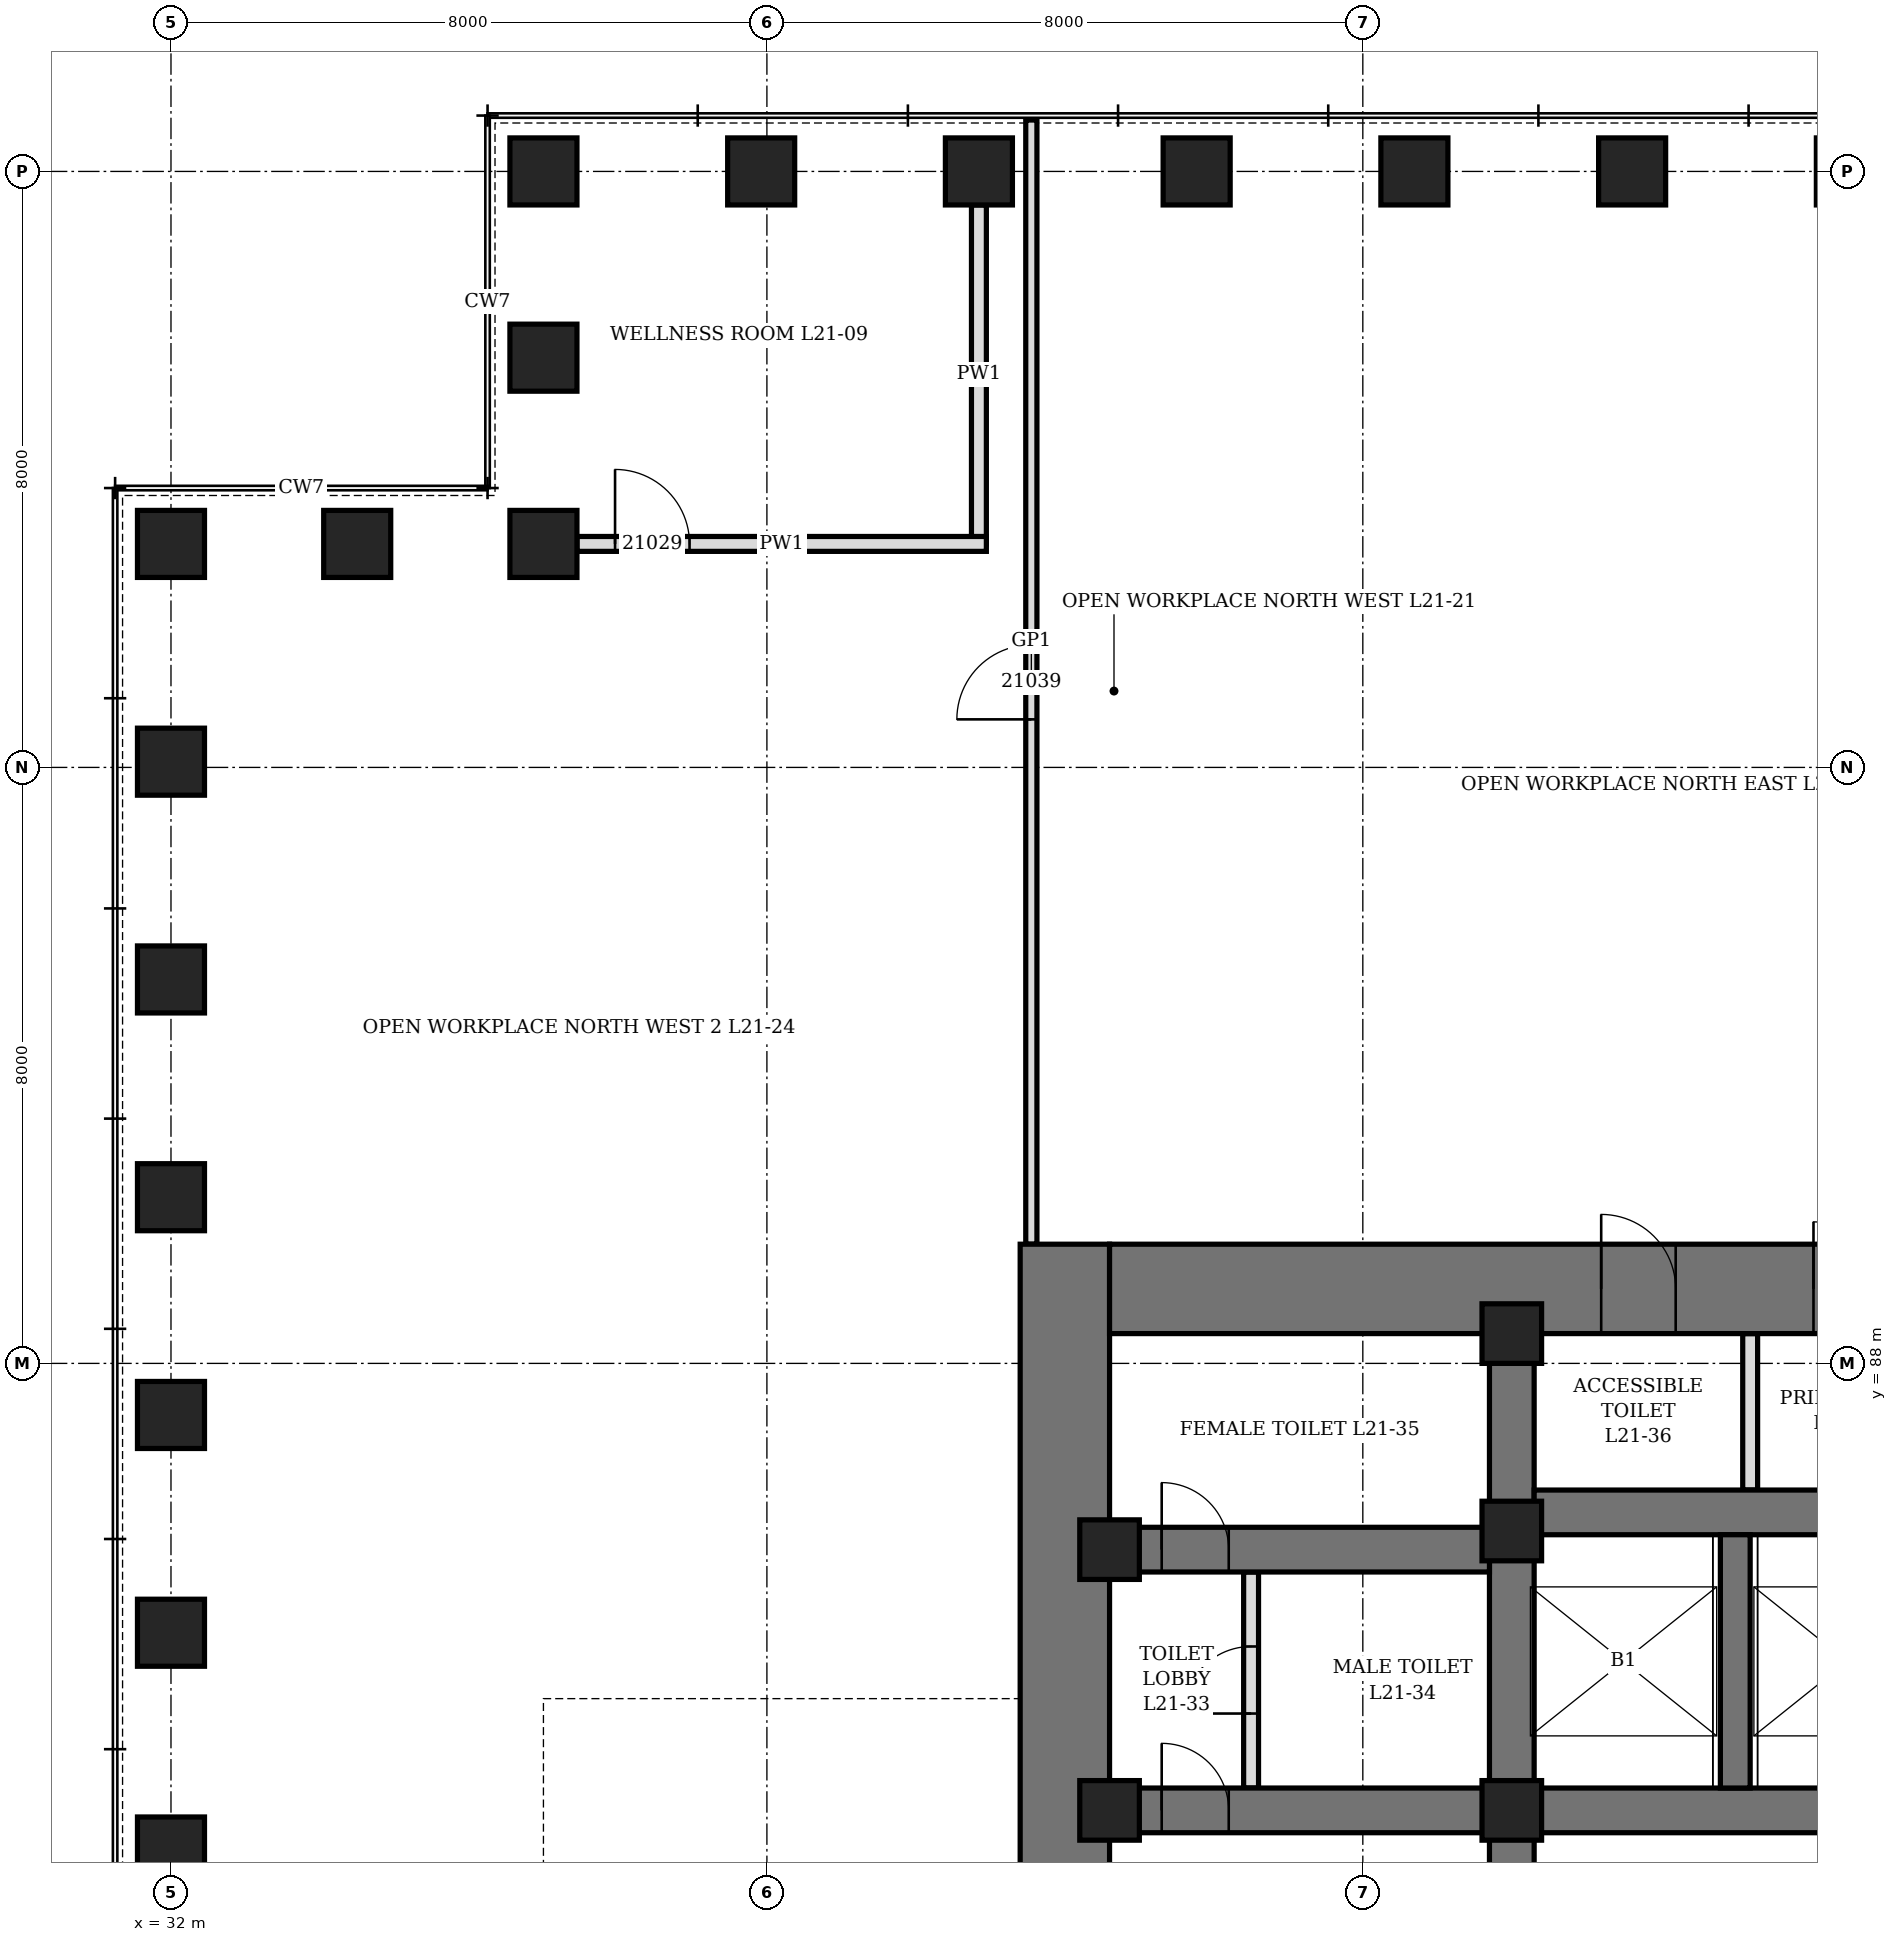
"""IFC4 building model, lengths in metres.
Left out: names, types, materials, properties, quantities, classifications, styles, units other than length and angle.
Written with IfcOpenShell. Run it as: python <this file> out.ifc"""

import sys

from ifc_helpers import new_model, si_unit, direction, frame, frame_2d, origin, origin_2d, place, context, subcontext, project, spatial, rectangle, hollow_rectangle, extrude, element, fill, save


model = new_model("IFC4")
c1 = context("Model", 3, precision=1e-05, world=origin(), true_north=direction((0.0, 1.0)))
c2 = subcontext(c1, "Body", "Model", "MODEL_VIEW")
j1 = project(units=[si_unit("LENGTHUNIT", "METRE"), si_unit("PLANEANGLEUNIT", "RADIAN")], contexts=[c1])
p1 = place(None, origin())
s1 = spatial("IfcSite", under=j1, at=p1, CompositionType="ELEMENT")
p2 = place(p1, origin())
s2 = spatial("IfcBuilding", under=s1, at=p2, CompositionType="ELEMENT")
p3 = place(p2, frame((0.0, 0.0, 97.9)))
s3 = spatial("IfcBuildingStorey", under=s2, at=p3, CompositionType="ELEMENT", Elevation=97.9)
for number, where, z_axis, x_axis in (
    (1, (54.539, 104.0, 0.0), (0.0, 0.0, 1.0), (1.0, 0.0, 0.0)),
    (2, (51.615, 104.0, 0.0), (0.0, 0.0, 1.0), (1.0, 0.0, 0.0)),
    (3, (48.692, 104.0, 0.0), (0.0, 0.0, 1.0), (1.0, 0.0, 0.0)),
    (4, (45.769, 104.0, 0.0), (0.0, 0.0, 1.0), (1.0, 0.0, 0.0)),
    (5, (42.846, 104.0, 0.0), (0.0, 0.0, 1.0), (1.0, 0.0, 0.0)),
    (6, (39.923, 104.0, 0.0), (0.0, 0.0, 1.0), (1.0, 0.0, 0.0)),
    (7, (37.0, 104.0, 0.0), (0.0, 0.0, 1.0), (0.0, 1.0, 0.0)),
    (8, (37.0, 101.5, 0.0), (0.0, 0.0, 1.0), (0.0, 1.0, 0.0)),
    (9, (37.0, 99.0, 0.0), (0.0, 0.0, 1.0), (1.0, 0.0, 0.0)),
    (10, (34.5, 99.0, 0.0), (0.0, 0.0, 1.0), (1.0, 0.0, 0.0)),
    (11, (32.0, 99.0, 0.0), (0.0, 0.0, 1.0), (0.0, 1.0, 0.0)),
    (12, (32.0, 96.077, 0.0), (0.0, 0.0, 1.0), (0.0, 1.0, 0.0)),
    (13, (32.0, 93.154, 0.0), (0.0, 0.0, 1.0), (0.0, 1.0, 0.0)),
    (14, (32.0, 90.231, 0.0), (0.0, 0.0, 1.0), (0.0, 1.0, 0.0)),
    (15, (32.0, 87.308, 0.0), (0.0, 0.0, 1.0), (0.0, 1.0, 0.0)),
    (16, (32.0, 84.385, 0.0), (0.0, 0.0, 1.0), (0.0, 1.0, 0.0)),
    (17, (32.0, 81.461, 0.0), (0.0, 0.0, 1.0), (0.0, 1.0, 0.0)),
):
    element("IfcColumn", number, at=place(p3, frame(where, z_axis=z_axis, x_axis=x_axis)), inside=s3, PredefinedType="COLUMN", context=c2, shape_type="SweptSolid", body=[
        extrude(hollow_rectangle(XDim=0.9, YDim=0.9, WallThickness=0.12, at=origin_2d()), origin(), (0.0, 0.0, 1.0), 4.2),
    ])
p4 = place(p3, frame((44.0, 70.4, 0.0), z_axis=(0.0, 0.0, 1.0), x_axis=(0.0, 1.0, 0.0)))
e18 = element("IfcWall", 18, at=p4, inside=s3, PredefinedType="SHEAR", context=c2, shape_type="SweptSolid", body=[
    extrude(rectangle(XDim=19.2, YDim=1.2, at=frame_2d((9.6, 0.0))), origin(), (0.0, 0.0, 1.0), 4.2),
])
p5 = place(p4, frame((8.6, 0.0, 0.0)))
e19 = element("IfcOpeningElement", 19, at=p5, cuts=e18, PredefinedType="OPENING", context=c2, shape_type="SweptSolid", body=[
    extrude(rectangle(XDim=2.0, YDim=2.4, at=frame_2d((1.0, 1.2))), frame((0.0, 0.61, 0.0), z_axis=(0.0, -1.0, 0.0), x_axis=(1.0, 0.0, 0.0)), (0.0, 0.0, 1.0), 1.22),
])
p6 = place(p3, frame((44.6, 89.0, 0.0), z_axis=(0.0, 0.0, 1.0), x_axis=(1.0, 0.0, 0.0)))
e20 = element("IfcWall", 20, at=p6, inside=s3, PredefinedType="SHEAR", context=c2, shape_type="SweptSolid", body=[
    extrude(rectangle(XDim=22.8, YDim=1.2, at=frame_2d((11.4, 0.0))), origin(), (0.0, 0.0, 1.0), 4.2),
])
p7 = place(p6, frame((6.6, 0.0, 0.0)))
e21 = element("IfcOpeningElement", 21, at=p7, cuts=e20, PredefinedType="OPENING", context=c2, shape_type="SweptSolid", body=[
    extrude(rectangle(XDim=1.0, YDim=2.1, at=frame_2d((0.5, 1.05))), frame((0.0, 0.61, 0.0), z_axis=(0.0, -1.0, 0.0), x_axis=(1.0, 0.0, 0.0)), (0.0, 0.0, 1.0), 1.22),
])
p8 = place(p6, frame((9.45, 0.0, 0.0)))
e22 = element("IfcOpeningElement", 22, at=p8, cuts=e20, PredefinedType="OPENING", context=c2, shape_type="SweptSolid", body=[
    extrude(rectangle(XDim=0.9, YDim=2.1, at=frame_2d((0.45, 1.05))), frame((0.0, 0.61, 0.0), z_axis=(0.0, -1.0, 0.0), x_axis=(1.0, 0.0, 0.0)), (0.0, 0.0, 1.0), 1.22),
])
p9 = place(p6, frame((13.05, 0.0, 0.0)))
e23 = element("IfcOpeningElement", 23, at=p9, cuts=e20, PredefinedType="OPENING", context=c2, shape_type="SweptSolid", body=[
    extrude(rectangle(XDim=0.9, YDim=2.1, at=frame_2d((0.45, 1.05))), frame((0.0, 0.61, 0.0), z_axis=(0.0, -1.0, 0.0), x_axis=(1.0, 0.0, 0.0)), (0.0, 0.0, 1.0), 1.22),
])
p10 = place(p3, frame((50.0, 71.6, 0.0), z_axis=(0.0, 0.0, 1.0), x_axis=(0.0, 1.0, 0.0)))
e24 = element("IfcWall", 24, at=p10, inside=s3, PredefinedType="SHEAR", context=c2, shape_type="SweptSolid", body=[
    extrude(rectangle(XDim=16.8, YDim=0.6, at=frame_2d((8.4, 0.0))), origin(), (0.0, 0.0, 1.0), 4.2),
])
p11 = place(p10, frame((7.5, 0.0, 0.0)))
e25 = element("IfcOpeningElement", 25, at=p11, cuts=e24, PredefinedType="OPENING", context=c2, shape_type="SweptSolid", body=[
    extrude(rectangle(XDim=1.8, YDim=2.4, at=frame_2d((0.9, 1.2))), frame((0.0, 0.31, 0.0), z_axis=(0.0, -1.0, 0.0), x_axis=(1.0, 0.0, 0.0)), (0.0, 0.0, 1.0), 0.62),
])
p12 = place(p3, frame((44.6, 82.0, 0.0), z_axis=(0.0, 0.0, 1.0), x_axis=(1.0, 0.0, 0.0)))
e26 = element("IfcWall", 26, at=p12, inside=s3, PredefinedType="SHEAR", context=c2, shape_type="SweptSolid", body=[
    extrude(rectangle(XDim=5.1, YDim=0.6, at=frame_2d((2.55, 0.0))), origin(), (0.0, 0.0, 1.0), 4.2),
])
p13 = place(p12, frame((0.7, 0.0, 0.0)))
e27 = element("IfcOpeningElement", 27, at=p13, cuts=e26, PredefinedType="OPENING", context=c2, shape_type="SweptSolid", body=[
    extrude(rectangle(XDim=0.9, YDim=2.1, at=frame_2d((0.45, 1.05))), frame((0.0, 0.31, 0.0), z_axis=(0.0, -1.0, 0.0), x_axis=(1.0, 0.0, 0.0)), (0.0, 0.0, 1.0), 0.62),
])
p14 = place(p3, frame((44.6, 85.5, 0.0), z_axis=(0.0, 0.0, 1.0), x_axis=(1.0, 0.0, 0.0)))
e28 = element("IfcWall", 28, at=p14, inside=s3, PredefinedType="SHEAR", context=c2, shape_type="SweptSolid", body=[
    extrude(rectangle(XDim=5.1, YDim=0.6, at=frame_2d((2.55, 0.0))), origin(), (0.0, 0.0, 1.0), 4.2),
])
p15 = place(p14, frame((0.7, 0.0, 0.0)))
e29 = element("IfcOpeningElement", 29, at=p15, cuts=e28, PredefinedType="OPENING", context=c2, shape_type="SweptSolid", body=[
    extrude(rectangle(XDim=0.9, YDim=2.1, at=frame_2d((0.45, 1.05))), frame((0.0, 0.31, 0.0), z_axis=(0.0, -1.0, 0.0), x_axis=(1.0, 0.0, 0.0)), (0.0, 0.0, 1.0), 0.62),
])
for number, where, z_axis, x_axis in (
    (30, (50.3, 82.0, 0.0), (0.0, 0.0, 1.0), (1.0, 0.0, 0.0)),
    (31, (50.3, 86.0, 0.0), (0.0, 0.0, 1.0), (1.0, 0.0, 0.0)),
):
    element("IfcWall", number, at=place(p3, frame(where, z_axis=z_axis, x_axis=x_axis)), inside=s3, PredefinedType="SHEAR", context=c2, shape_type="SweptSolid", body=[
        extrude(rectangle(XDim=11.4, YDim=0.6, at=frame_2d((5.7, 0.0))), origin(), (0.0, 0.0, 1.0), 4.2),
    ])
p16 = place(p3, frame((53.0, 82.3, 0.0), z_axis=(0.0, 0.0, 1.0), x_axis=(0.0, 1.0, 0.0)))
e32 = element("IfcWall", 32, at=p16, inside=s3, PredefinedType="SHEAR", context=c2, shape_type="SweptSolid", body=[
    extrude(rectangle(XDim=3.4, YDim=0.4, at=frame_2d((1.7, 0.0))), origin(), (0.0, 0.0, 1.0), 4.2),
])
for number, where, z_axis, x_axis in (
    (33, (44.6, 82.0, 0.0), (0.0, 0.0, 1.0), (1.0, 0.0, 0.0)),
    (34, (44.6, 85.5, 0.0), (0.0, 0.0, 1.0), (1.0, 0.0, 0.0)),
    (35, (50.0, 82.0, 0.0), (0.0, 0.0, 1.0), (1.0, 0.0, 0.0)),
    (36, (50.0, 85.75, 0.0), (0.0, 0.0, 1.0), (1.0, 0.0, 0.0)),
    (37, (50.0, 88.4, 0.0), (0.0, 0.0, 1.0), (1.0, 0.0, 0.0)),
):
    element("IfcColumn", number, at=place(p3, frame(where, z_axis=z_axis, x_axis=x_axis)), inside=s3, PredefinedType="COLUMN", context=c2, shape_type="SweptSolid", body=[
        extrude(hollow_rectangle(XDim=0.8, YDim=0.8, WallThickness=0.1, at=origin_2d()), origin(), (0.0, 0.0, 1.0), 4.2),
    ])
p17 = place(p3, frame((46.5, 82.3, 0.0), z_axis=(0.0, 0.0, 1.0), x_axis=(0.0, 1.0, 0.0)))
e38 = element("IfcWall", 38, at=p17, inside=s3, PredefinedType="PARTITIONING", context=c2, shape_type="SweptSolid", body=[
    extrude(rectangle(XDim=2.9, YDim=0.2, at=frame_2d((1.45, 0.0))), origin(), (0.0, 0.0, 1.0), 3.95),
])
p18 = place(p17, frame((1.0, 0.0, 0.0)))
e39 = element("IfcOpeningElement", 39, at=p18, cuts=e38, PredefinedType="OPENING", context=c2, shape_type="SweptSolid", body=[
    extrude(rectangle(XDim=0.9, YDim=2.1, at=frame_2d((0.45, 1.05))), frame((0.0, 0.11, 0.0), z_axis=(0.0, -1.0, 0.0), x_axis=(1.0, 0.0, 0.0)), (0.0, 0.0, 1.0), 0.22),
])
p19 = place(p3, frame((53.2, 86.3, 0.0), z_axis=(0.0, 0.0, 1.0), x_axis=(0.0, 1.0, 0.0)))
e40 = element("IfcWall", 40, at=p19, inside=s3, PredefinedType="PARTITIONING", context=c2, shape_type="SweptSolid", body=[
    extrude(rectangle(XDim=2.1, YDim=0.2, at=frame_2d((1.05, 0.0))), origin(), (0.0, 0.0, 1.0), 3.95),
])
p20 = place(p3, frame((42.846, 99.0, 0.0), z_axis=(0.0, 0.0, 1.0), x_axis=(0.0, 1.0, 0.0)))
e41 = element("IfcWall", 41, at=p20, inside=s3, PredefinedType="PARTITIONING", context=c2, shape_type="SweptSolid", body=[
    extrude(rectangle(XDim=4.55, YDim=0.2, at=frame_2d((2.275, 0.0))), origin(), (0.0, 0.0, 1.0), 1.95),
])
p21 = place(p3, frame((37.45, 99.0, 0.0), z_axis=(0.0, 0.0, 1.0), x_axis=(1.0, 0.0, 0.0)))
e42 = element("IfcWall", 42, at=p21, inside=s3, PredefinedType="PARTITIONING", context=c2, shape_type="SweptSolid", body=[
    extrude(rectangle(XDim=5.496, YDim=0.2, at=frame_2d((2.748, 0.0))), origin(), (0.0, 0.0, 1.0), 3.95),
])
p22 = place(p21, frame((0.511, 0.0, 0.0)))
e43 = element("IfcOpeningElement", 43, at=p22, cuts=e42, PredefinedType="OPENING", context=c2, shape_type="SweptSolid", body=[
    extrude(rectangle(XDim=1.0, YDim=2.1, at=frame_2d((0.5, 1.05))), frame((0.0, 0.11, 0.0), z_axis=(0.0, -1.0, 0.0), x_axis=(1.0, 0.0, 0.0)), (0.0, 0.0, 1.0), 0.22),
])
p23 = place(p3, frame((43.55, 89.6, 0.0), z_axis=(0.0, 0.0, 1.0), x_axis=(0.0, 1.0, 0.0)))
e44 = element("IfcWall", 44, at=p23, inside=s3, PredefinedType="PARTITIONING", context=c2, shape_type="SweptSolid", body=[
    extrude(rectangle(XDim=15.09, YDim=0.15, at=frame_2d((7.545, 0.0))), origin(), (0.0, 0.0, 1.0), 3.95),
])
p24 = place(p23, frame((7.045, 0.0, 0.0)))
e45 = element("IfcOpeningElement", 45, at=p24, cuts=e44, PredefinedType="OPENING", context=c2, shape_type="SweptSolid", body=[
    extrude(rectangle(XDim=1.0, YDim=2.4, at=frame_2d((0.5, 1.2))), frame((0.0, 0.085, 0.0), z_axis=(0.0, -1.0, 0.0), x_axis=(1.0, 0.0, 0.0)), (0.0, 0.0, 1.0), 0.17),
])
p25 = place(p13, origin())
e46 = element("IfcDoor", 46, at=p25, inside=s3, OperationType="SINGLE_SWING_LEFT", PredefinedType="DOOR", context=c2, shape_type="SweptSolid", body=[
    extrude(rectangle(XDim=0.9, YDim=2.1, at=frame_2d((0.45, 1.05))), frame((0.0, 0.3, 0.0), z_axis=(0.0, -1.0, 0.0), x_axis=(1.0, 0.0, 0.0)), (0.0, 0.0, 1.0), 0.6),
])
fill(e27, e46)
p26 = place(p18, origin())
e47 = element("IfcDoor", 47, at=p26, inside=s3, OperationType="SINGLE_SWING_RIGHT", PredefinedType="DOOR", context=c2, shape_type="SweptSolid", body=[
    extrude(rectangle(XDim=0.9, YDim=2.1, at=frame_2d((0.45, 1.05))), frame((0.0, 0.1, 0.0), z_axis=(0.0, -1.0, 0.0), x_axis=(1.0, 0.0, 0.0)), (0.0, 0.0, 1.0), 0.199),
])
fill(e39, e47)
p27 = place(p15, origin())
e48 = element("IfcDoor", 48, at=p27, inside=s3, OperationType="SINGLE_SWING_RIGHT", PredefinedType="DOOR", context=c2, shape_type="SweptSolid", body=[
    extrude(rectangle(XDim=0.9, YDim=2.1, at=frame_2d((0.45, 1.05))), frame((0.0, 0.3, 0.0), z_axis=(0.0, -1.0, 0.0), x_axis=(1.0, 0.0, 0.0)), (0.0, 0.0, 1.0), 0.6),
])
fill(e29, e48)
p28 = place(p7, origin())
e49 = element("IfcDoor", 49, at=p28, inside=s3, OperationType="SINGLE_SWING_LEFT", PredefinedType="DOOR", context=c2, shape_type="SweptSolid", body=[
    extrude(rectangle(XDim=1.0, YDim=2.1, at=frame_2d((0.5, 1.05))), frame((0.0, 0.35, 0.0), z_axis=(0.0, -1.0, 0.0), x_axis=(1.0, 0.0, 0.0)), (0.0, 0.0, 1.0), 0.7),
])
fill(e21, e49)
p29 = place(p8, origin())
e50 = element("IfcDoor", 50, at=p29, inside=s3, OperationType="SINGLE_SWING_LEFT", PredefinedType="DOOR", context=c2, shape_type="SweptSolid", body=[
    extrude(rectangle(XDim=0.9, YDim=2.1, at=frame_2d((0.45, 1.05))), frame((0.0, 0.35, 0.0), z_axis=(0.0, -1.0, 0.0), x_axis=(1.0, 0.0, 0.0)), (0.0, 0.0, 1.0), 0.7),
])
fill(e22, e50)
p30 = place(p22, origin())
e51 = element("IfcDoor", 51, at=p30, inside=s3, OperationType="SINGLE_SWING_LEFT", PredefinedType="DOOR", context=c2, shape_type="SweptSolid", body=[
    extrude(rectangle(XDim=1.0, YDim=2.1, at=frame_2d((0.5, 1.05))), frame((0.0, 0.1, 0.0), z_axis=(0.0, -1.0, 0.0), x_axis=(1.0, 0.0, 0.0)), (0.0, 0.0, 1.0), 0.199),
])
fill(e43, e51)
p31 = place(p24, origin())
e52 = element("IfcDoor", 52, at=p31, inside=s3, OperationType="SINGLE_SWING_RIGHT", PredefinedType="DOOR", context=c2, shape_type="SweptSolid", body=[
    extrude(rectangle(XDim=1.0, YDim=2.4, at=frame_2d((0.5, 1.2))), frame((0.0, 0.075, 0.0), z_axis=(0.0, -1.0, 0.0), x_axis=(1.0, 0.0, 0.0)), (0.0, 0.0, 1.0), 0.149),
])
fill(e45, e52)
save(model, sys.argv[1])
